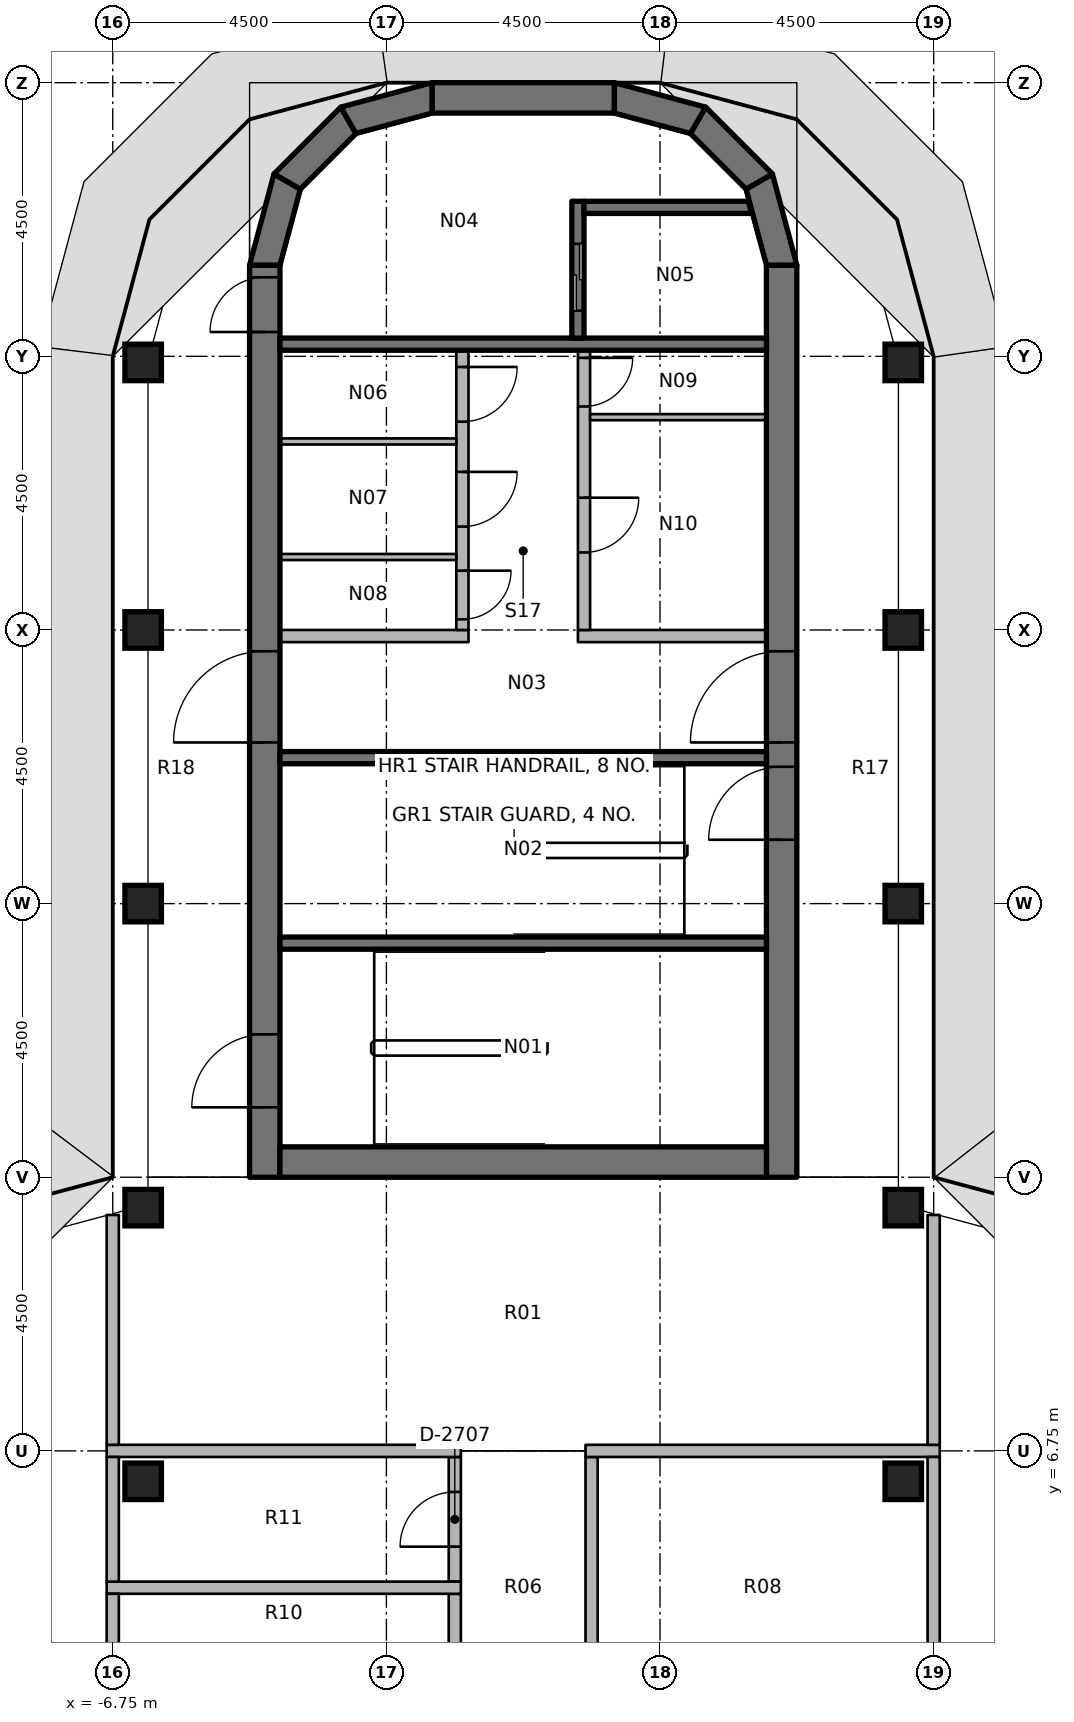
"""IFC4 building model, lengths in metres.
Left out: names, types, materials, properties, quantities, classifications, styles, units other than length and angle.
Written with IfcOpenShell. Run it as: python <this file> out.ifc"""

import sys

from ifc_helpers import new_model, si_unit, direction, frame, frame_2d, origin, origin_2d, place, context, subcontext, project, spatial, polyline, rectangle, outline, extrude, element, fill, save


model = new_model("IFC4")
c1 = context("Model", 3, precision=1e-05, world=origin(), true_north=direction((0.0, 1.0)))
c2 = subcontext(c1, "Body", "Model", "MODEL_VIEW")
j1 = project(units=[si_unit("LENGTHUNIT", "METRE"), si_unit("PLANEANGLEUNIT", "RADIAN")], contexts=[c1])
p1 = place(None, origin())
s1 = spatial("IfcSite", under=j1, at=p1, CompositionType="ELEMENT")
p2 = place(p1, origin())
s2 = spatial("IfcBuilding", under=s1, at=p2, CompositionType="ELEMENT")
p3 = place(p2, frame((0.0, 0.0, 253.6)))
s3 = spatial("IfcBuildingStorey", under=s2, at=p3, CompositionType="ELEMENT", Elevation=253.6)
for number, where, z_axis, x_axis in (
    (1, (-6.25, 6.25, 0.0), (0.0, 0.0, 1.0), (1.0, 0.0, 0.0)),
    (2, (-6.25, 10.75, 0.0), (0.0, 0.0, 1.0), (1.0, 0.0, 0.0)),
    (3, (-6.25, 15.75, 0.0), (0.0, 0.0, 1.0), (1.0, 0.0, 0.0)),
    (4, (-6.25, 20.25, 0.0), (0.0, 0.0, 1.0), (1.0, 0.0, 0.0)),
    (5, (-6.25, 24.65, 0.0), (0.0, 0.0, 1.0), (1.0, 0.0, 0.0)),
    (6, (6.25, 6.25, 0.0), (0.0, 0.0, 1.0), (1.0, 0.0, 0.0)),
    (7, (6.25, 10.75, 0.0), (0.0, 0.0, 1.0), (1.0, 0.0, 0.0)),
    (8, (6.25, 15.75, 0.0), (0.0, 0.0, 1.0), (1.0, 0.0, 0.0)),
    (9, (6.25, 20.25, 0.0), (0.0, 0.0, 1.0), (1.0, 0.0, 0.0)),
    (10, (6.25, 24.65, 0.0), (0.0, 0.0, 1.0), (1.0, 0.0, 0.0)),
):
    element("IfcColumn", number, at=place(p3, frame(where, z_axis=z_axis, x_axis=x_axis)), inside=s3, PredefinedType="COLUMN", context=c2, shape_type="SweptSolid", body=[
        extrude(rectangle(XDim=0.6, YDim=0.6, at=origin_2d()), origin(), (0.0, 0.0, 1.0), 3.65),
    ])
p4 = place(p3, frame((-4.25, 11.25, 0.0), z_axis=(0.0, 0.0, 1.0), x_axis=(0.0, 1.0, 0.0)))
e11 = element("IfcWall", 11, at=p4, inside=s3, PredefinedType="SHEAR", context=c2, shape_type="SweptSolid", body=[
    extrude(rectangle(XDim=15.0, YDim=0.5, at=frame_2d((7.5, 0.0))), origin(), (0.0, 0.0, 1.0), 3.8),
])
p5 = place(p4, frame((7.15, 0.0, 0.0)))
e12 = element("IfcOpeningElement", 12, at=p5, cuts=e11, PredefinedType="OPENING", context=c2, shape_type="SweptSolid", body=[
    extrude(rectangle(XDim=1.5, YDim=2.3, at=frame_2d((0.75, 1.15))), frame((0.0, 0.26, 0.0), z_axis=(0.0, -1.0, 0.0), x_axis=(1.0, 0.0, 0.0)), (0.0, 0.0, 1.0), 0.52),
])
p6 = place(p4, frame((13.9, 0.0, 0.0)))
e13 = element("IfcOpeningElement", 13, at=p6, cuts=e11, PredefinedType="OPENING", context=c2, shape_type="SweptSolid", body=[
    extrude(rectangle(XDim=0.9, YDim=2.1, at=frame_2d((0.45, 1.05))), frame((0.0, 0.26, 0.0), z_axis=(0.0, -1.0, 0.0), x_axis=(1.0, 0.0, 0.0)), (0.0, 0.0, 1.0), 0.52),
])
p7 = place(p4, frame((1.15, 0.0, 0.0)))
e14 = element("IfcOpeningElement", 14, at=p7, cuts=e11, PredefinedType="OPENING", context=c2, shape_type="SweptSolid", body=[
    extrude(rectangle(XDim=1.2, YDim=2.1, at=frame_2d((0.6, 1.05))), frame((0.0, 0.26, 0.0), z_axis=(0.0, -1.0, 0.0), x_axis=(1.0, 0.0, 0.0)), (0.0, 0.0, 1.0), 0.52),
])
p8 = place(p3, frame((4.25, 11.25, 0.0), z_axis=(0.0, 0.0, 1.0), x_axis=(0.0, 1.0, 0.0)))
e15 = element("IfcWall", 15, at=p8, inside=s3, PredefinedType="SHEAR", context=c2, shape_type="SweptSolid", body=[
    extrude(rectangle(XDim=15.0, YDim=0.5, at=frame_2d((7.5, 0.0))), origin(), (0.0, 0.0, 1.0), 3.8),
])
p9 = place(p8, frame((7.15, 0.0, 0.0)))
e16 = element("IfcOpeningElement", 16, at=p9, cuts=e15, PredefinedType="OPENING", context=c2, shape_type="SweptSolid", body=[
    extrude(rectangle(XDim=1.5, YDim=2.3, at=frame_2d((0.75, 1.15))), frame((0.0, 0.26, 0.0), z_axis=(0.0, -1.0, 0.0), x_axis=(1.0, 0.0, 0.0)), (0.0, 0.0, 1.0), 0.52),
])
p10 = place(p8, frame((5.55, 0.0, 0.0)))
e17 = element("IfcOpeningElement", 17, at=p10, cuts=e15, PredefinedType="OPENING", context=c2, shape_type="SweptSolid", body=[
    extrude(rectangle(XDim=1.2, YDim=2.1, at=frame_2d((0.6, 1.05))), frame((0.0, 0.26, 0.0), z_axis=(0.0, -1.0, 0.0), x_axis=(1.0, 0.0, 0.0)), (0.0, 0.0, 1.0), 0.52),
])
p11 = place(p3, frame((-4.0, 11.5, 0.0), z_axis=(0.0, 0.0, 1.0), x_axis=(1.0, 0.0, 0.0)))
e18 = element("IfcWall", 18, at=p11, inside=s3, PredefinedType="SHEAR", context=c2, shape_type="SweptSolid", body=[
    extrude(rectangle(XDim=8.0, YDim=0.5, at=frame_2d((4.0, 0.0))), origin(), (0.0, 0.0, 1.0), 3.8),
])
p12 = place(p3, frame((-1.5, 29.0, 0.0), z_axis=(0.0, 0.0, 1.0), x_axis=(1.0, 0.0, 0.0)))
e19 = element("IfcWall", 19, at=p12, inside=s3, PredefinedType="SHEAR", context=c2, shape_type="SweptSolid", body=[
    extrude(rectangle(XDim=3.0, YDim=0.5, at=frame_2d((1.5, 0.0))), origin(), (0.0, 0.0, 1.0), 3.8),
])
p13 = place(p3, origin())
e20 = element("IfcWall", 20, at=p13, inside=s3, PredefinedType="SHEAR", context=c2, shape_type="SweptSolid", body=[
    extrude(outline(polyline([(-4.5, 26.25), (-4.098, 27.75), (-3.665, 27.5), (-4.0, 26.25), (-4.5, 26.25)])), origin(), (0.0, 0.0, 1.0), 3.8),
])
p14 = place(p3, origin())
e21 = element("IfcWall", 21, at=p14, inside=s3, PredefinedType="SHEAR", context=c2, shape_type="SweptSolid", body=[
    extrude(outline(polyline([(-4.098, 27.75), (-3.0, 28.848), (-2.75, 28.415), (-3.665, 27.5), (-4.098, 27.75)])), origin(), (0.0, 0.0, 1.0), 3.8),
])
p15 = place(p3, origin())
e22 = element("IfcWall", 22, at=p15, inside=s3, PredefinedType="SHEAR", context=c2, shape_type="SweptSolid", body=[
    extrude(outline(polyline([(-3.0, 28.848), (-1.5, 29.25), (-1.5, 28.75), (-2.75, 28.415), (-3.0, 28.848)])), origin(), (0.0, 0.0, 1.0), 3.8),
])
p16 = place(p3, origin())
e23 = element("IfcWall", 23, at=p16, inside=s3, PredefinedType="SHEAR", context=c2, shape_type="SweptSolid", body=[
    extrude(outline(polyline([(4.5, 26.25), (4.098, 27.75), (3.665, 27.5), (4.0, 26.25), (4.5, 26.25)])), origin(), (0.0, 0.0, 1.0), 3.8),
])
p17 = place(p3, origin())
e24 = element("IfcWall", 24, at=p17, inside=s3, PredefinedType="SHEAR", context=c2, shape_type="SweptSolid", body=[
    extrude(outline(polyline([(4.098, 27.75), (3.0, 28.848), (2.75, 28.415), (3.665, 27.5), (4.098, 27.75)])), origin(), (0.0, 0.0, 1.0), 3.8),
])
p18 = place(p3, origin())
e25 = element("IfcWall", 25, at=p18, inside=s3, PredefinedType="SHEAR", context=c2, shape_type="SweptSolid", body=[
    extrude(outline(polyline([(3.0, 28.848), (1.5, 29.25), (1.5, 28.75), (2.75, 28.415), (3.0, 28.848)])), origin(), (0.0, 0.0, 1.0), 3.8),
])
p19 = place(p3, frame((-4.0, 24.95, 0.0), z_axis=(0.0, 0.0, 1.0), x_axis=(1.0, 0.0, 0.0)))
e26 = element("IfcWall", 26, at=p19, inside=s3, PredefinedType="SHEAR", context=c2, shape_type="SweptSolid", body=[
    extrude(rectangle(XDim=8.0, YDim=0.2, at=frame_2d((4.0, 0.0))), origin(), (0.0, 0.0, 1.0), 3.65),
])
p20 = place(p3, frame((0.9, 27.3, 0.0), z_axis=(0.0, 0.0, 1.0), x_axis=(0.0, -1.0, 0.0)))
e27 = element("IfcWall", 27, at=p20, inside=s3, PredefinedType="SHEAR", context=c2, shape_type="SweptSolid", body=[
    extrude(rectangle(XDim=2.25, YDim=0.2, at=frame_2d((1.125, 0.0))), origin(), (0.0, 0.0, 1.0), 3.65),
])
p21 = place(p20, frame((0.7, 0.0, 0.0)))
e28 = element("IfcOpeningElement", 28, at=p21, cuts=e27, PredefinedType="OPENING", context=c2, shape_type="SweptSolid", body=[
    extrude(rectangle(XDim=1.1, YDim=2.3, at=frame_2d((0.55, 1.15))), frame((0.0, 0.11, 0.0), z_axis=(0.0, -1.0, 0.0), x_axis=(1.0, 0.0, 0.0)), (0.0, 0.0, 1.0), 0.22),
])
p22 = place(p3, origin())
e29 = element("IfcWall", 29, at=p22, inside=s3, PredefinedType="SHEAR", context=c2, shape_type="SweptSolid", body=[
    extrude(outline(polyline([(1.0, 27.1), (3.755, 27.1), (3.701, 27.3), (1.0, 27.3), (1.0, 27.1)])), origin(), (0.0, 0.0, 1.0), 3.65),
])
for number, where, z_axis, x_axis in (
    (30, (-4.0, 18.15, 0.0), (0.0, 0.0, 1.0), (1.0, 0.0, 0.0)),
    (31, (-4.0, 15.1, 0.0), (0.0, 0.0, 1.0), (1.0, 0.0, 0.0)),
):
    element("IfcWall", number, at=place(p3, frame(where, z_axis=z_axis, x_axis=x_axis)), inside=s3, PredefinedType="SHEAR", context=c2, shape_type="SweptSolid", body=[
        extrude(rectangle(XDim=8.0, YDim=0.2, at=frame_2d((4.0, 0.0))), origin(), (0.0, 0.0, 1.0), 3.65),
    ])
p23 = place(p3, frame((-4.0, 20.15, 0.0), z_axis=(0.0, 0.0, 1.0), x_axis=(1.0, 0.0, 0.0)))
e32 = element("IfcWall", 32, at=p23, inside=s3, PredefinedType="PARTITIONING", context=c2, shape_type="SweptSolid", body=[
    extrude(rectangle(XDim=3.1, YDim=0.2, at=frame_2d((1.55, 0.0))), origin(), (0.0, 0.0, 1.0), 3.65),
])
p24 = place(p3, frame((-1.0, 24.85, 0.0), z_axis=(0.0, 0.0, 1.0), x_axis=(0.0, -1.0, 0.0)))
e33 = element("IfcWall", 33, at=p24, inside=s3, PredefinedType="PARTITIONING", context=c2, shape_type="SweptSolid", body=[
    extrude(rectangle(XDim=4.6, YDim=0.2, at=frame_2d((2.3, 0.0))), origin(), (0.0, 0.0, 1.0), 3.65),
])
p25 = place(p24, frame((0.275, 0.0, 0.0)))
e34 = element("IfcOpeningElement", 34, at=p25, cuts=e33, PredefinedType="OPENING", context=c2, shape_type="SweptSolid", body=[
    extrude(rectangle(XDim=0.9, YDim=2.1, at=frame_2d((0.45, 1.05))), frame((0.0, 0.11, 0.0), z_axis=(0.0, -1.0, 0.0), x_axis=(1.0, 0.0, 0.0)), (0.0, 0.0, 1.0), 0.22),
])
p26 = place(p24, frame((2.0, 0.0, 0.0)))
e35 = element("IfcOpeningElement", 35, at=p26, cuts=e33, PredefinedType="OPENING", context=c2, shape_type="SweptSolid", body=[
    extrude(rectangle(XDim=0.9, YDim=2.1, at=frame_2d((0.45, 1.05))), frame((0.0, 0.11, 0.0), z_axis=(0.0, -1.0, 0.0), x_axis=(1.0, 0.0, 0.0)), (0.0, 0.0, 1.0), 0.22),
])
p27 = place(p24, frame((3.625, 0.0, 0.0)))
e36 = element("IfcOpeningElement", 36, at=p27, cuts=e33, PredefinedType="OPENING", context=c2, shape_type="SweptSolid", body=[
    extrude(rectangle(XDim=0.8, YDim=2.1, at=frame_2d((0.4, 1.05))), frame((0.0, 0.11, 0.0), z_axis=(0.0, -1.0, 0.0), x_axis=(1.0, 0.0, 0.0)), (0.0, 0.0, 1.0), 0.22),
])
p28 = place(p3, frame((0.9, 20.15, 0.0), z_axis=(0.0, 0.0, 1.0), x_axis=(1.0, 0.0, 0.0)))
e37 = element("IfcWall", 37, at=p28, inside=s3, PredefinedType="PARTITIONING", context=c2, shape_type="SweptSolid", body=[
    extrude(rectangle(XDim=3.1, YDim=0.2, at=frame_2d((1.55, 0.0))), origin(), (0.0, 0.0, 1.0), 3.65),
])
p29 = place(p3, frame((1.0, 24.85, 0.0), z_axis=(0.0, 0.0, 1.0), x_axis=(0.0, -1.0, 0.0)))
e38 = element("IfcWall", 38, at=p29, inside=s3, PredefinedType="PARTITIONING", context=c2, shape_type="SweptSolid", body=[
    extrude(rectangle(XDim=4.6, YDim=0.2, at=frame_2d((2.3, 0.0))), origin(), (0.0, 0.0, 1.0), 3.65),
])
p30 = place(p29, frame((0.125, 0.0, 0.0)))
e39 = element("IfcOpeningElement", 39, at=p30, cuts=e38, PredefinedType="OPENING", context=c2, shape_type="SweptSolid", body=[
    extrude(rectangle(XDim=0.8, YDim=2.1, at=frame_2d((0.4, 1.05))), frame((0.0, 0.11, 0.0), z_axis=(0.0, -1.0, 0.0), x_axis=(1.0, 0.0, 0.0)), (0.0, 0.0, 1.0), 0.22),
])
p31 = place(p29, frame((2.425, 0.0, 0.0)))
e40 = element("IfcOpeningElement", 40, at=p31, cuts=e38, PredefinedType="OPENING", context=c2, shape_type="SweptSolid", body=[
    extrude(rectangle(XDim=0.9, YDim=2.1, at=frame_2d((0.45, 1.05))), frame((0.0, 0.11, 0.0), z_axis=(0.0, -1.0, 0.0), x_axis=(1.0, 0.0, 0.0)), (0.0, 0.0, 1.0), 0.22),
])
for number, where, z_axis, x_axis in (
    (41, (-4.0, 23.35, 0.0), (0.0, 0.0, 1.0), (1.0, 0.0, 0.0)),
    (42, (-4.0, 21.45, 0.0), (0.0, 0.0, 1.0), (1.0, 0.0, 0.0)),
    (43, (1.1, 23.75, 0.0), (0.0, 0.0, 1.0), (1.0, 0.0, 0.0)),
):
    element("IfcWall", number, at=place(p3, frame(where, z_axis=z_axis, x_axis=x_axis)), inside=s3, PredefinedType="PARTITIONING", context=c2, shape_type="SweptSolid", body=[
        extrude(rectangle(XDim=2.9, YDim=0.1, at=frame_2d((1.45, 0.0))), origin(), (0.0, 0.0, 1.0), 3.65),
    ])
p32 = place(p3, frame((1.125, 2.35, 0.0), z_axis=(0.0, 0.0, 1.0), x_axis=(0.0, 1.0, 0.0)))
e44 = element("IfcWall", 44, at=p32, inside=s3, PredefinedType="PARTITIONING", context=c2, shape_type="SweptSolid", body=[
    extrude(rectangle(XDim=4.3, YDim=0.2, at=frame_2d((2.15, 0.0))), origin(), (0.0, 0.0, 1.0), 2.75),
])
p33 = place(p3, frame((-1.125, 2.35, 0.0), z_axis=(0.0, 0.0, 1.0), x_axis=(0.0, 1.0, 0.0)))
e45 = element("IfcWall", 45, at=p33, inside=s3, PredefinedType="PARTITIONING", context=c2, shape_type="SweptSolid", body=[
    extrude(rectangle(XDim=2.05, YDim=0.2, at=frame_2d((1.025, 0.0))), origin(), (0.0, 0.0, 1.0), 2.75),
])
p34 = place(p3, frame((-1.125, 4.6, 0.0), z_axis=(0.0, 0.0, 1.0), x_axis=(0.0, 1.0, 0.0)))
e46 = element("IfcWall", 46, at=p34, inside=s3, PredefinedType="PARTITIONING", context=c2, shape_type="SweptSolid", body=[
    extrude(rectangle(XDim=2.05, YDim=0.2, at=frame_2d((1.025, 0.0))), origin(), (0.0, 0.0, 1.0), 2.75),
])
p35 = place(p34, frame((0.575, 0.0, 0.0)))
e47 = element("IfcOpeningElement", 47, at=p35, cuts=e46, PredefinedType="OPENING", context=c2, shape_type="SweptSolid", body=[
    extrude(rectangle(XDim=0.9, YDim=2.1, at=frame_2d((0.45, 1.05))), frame((0.0, 0.11, 0.0), z_axis=(0.0, -1.0, 0.0), x_axis=(1.0, 0.0, 0.0)), (0.0, 0.0, 1.0), 0.22),
])
p36 = place(p3, frame((1.025, 6.75, 0.0), z_axis=(0.0, 0.0, 1.0), x_axis=(1.0, 0.0, 0.0)))
e48 = element("IfcWall", 48, at=p36, inside=s3, PredefinedType="PARTITIONING", context=c2, shape_type="SweptSolid", body=[
    extrude(rectangle(XDim=5.825, YDim=0.2, at=frame_2d((2.913, 0.0))), origin(), (0.0, 0.0, 1.0), 2.75),
])
p37 = place(p3, frame((6.75, 6.85, 0.0), z_axis=(0.0, 0.0, 1.0), x_axis=(0.0, 1.0, 0.0)))
e49 = element("IfcWall", 49, at=p37, inside=s3, PredefinedType="PARTITIONING", context=c2, shape_type="SweptSolid", body=[
    extrude(rectangle(XDim=3.78, YDim=0.2, at=frame_2d((1.89, 0.0))), origin(), (0.0, 0.0, 1.0), 2.75),
])
p38 = place(p3, frame((-6.85, 6.75, 0.0), z_axis=(0.0, 0.0, 1.0), x_axis=(1.0, 0.0, 0.0)))
e50 = element("IfcWall", 50, at=p38, inside=s3, PredefinedType="PARTITIONING", context=c2, shape_type="SweptSolid", body=[
    extrude(rectangle(XDim=5.825, YDim=0.2, at=frame_2d((2.913, 0.0))), origin(), (0.0, 0.0, 1.0), 2.75),
])
p39 = place(p3, frame((-6.75, 6.85, 0.0), z_axis=(0.0, 0.0, 1.0), x_axis=(0.0, 1.0, 0.0)))
e51 = element("IfcWall", 51, at=p39, inside=s3, PredefinedType="PARTITIONING", context=c2, shape_type="SweptSolid", body=[
    extrude(rectangle(XDim=3.78, YDim=0.2, at=frame_2d((1.89, 0.0))), origin(), (0.0, 0.0, 1.0), 2.75),
])
p40 = place(p3, frame((6.75, 2.35, 0.0), z_axis=(0.0, 0.0, 1.0), x_axis=(0.0, 1.0, 0.0)))
e52 = element("IfcWall", 52, at=p40, inside=s3, PredefinedType="PARTITIONING", context=c2, shape_type="SweptSolid", body=[
    extrude(rectangle(XDim=4.3, YDim=0.2, at=frame_2d((2.15, 0.0))), origin(), (0.0, 0.0, 1.0), 2.75),
])
p41 = place(p3, frame((-6.85, 4.5, 0.0), z_axis=(0.0, 0.0, 1.0), x_axis=(1.0, 0.0, 0.0)))
e53 = element("IfcWall", 53, at=p41, inside=s3, PredefinedType="PARTITIONING", context=c2, shape_type="SweptSolid", body=[
    extrude(rectangle(XDim=5.825, YDim=0.2, at=frame_2d((2.913, 0.0))), origin(), (0.0, 0.0, 1.0), 2.75),
])
for number, where, z_axis, x_axis in (
    (54, (-6.75, 2.35, 0.0), (0.0, 0.0, 1.0), (0.0, 1.0, 0.0)),
    (55, (-6.75, 4.6, 0.0), (0.0, 0.0, 1.0), (0.0, 1.0, 0.0)),
):
    element("IfcWall", number, at=place(p3, frame(where, z_axis=z_axis, x_axis=x_axis)), inside=s3, PredefinedType="PARTITIONING", context=c2, shape_type="SweptSolid", body=[
        extrude(rectangle(XDim=2.05, YDim=0.2, at=frame_2d((1.025, 0.0))), origin(), (0.0, 0.0, 1.0), 2.75),
    ])
p42 = place(p5, origin())
e56 = element("IfcDoor", 56, at=p42, inside=s3, OperationType="DOUBLE_DOOR_SINGLE_SWING", PredefinedType="DOOR", context=c2, shape_type="SweptSolid", body=[
    extrude(rectangle(XDim=1.5, YDim=2.3, at=frame_2d((0.75, 1.15))), frame((0.0, 0.025, 0.0), z_axis=(0.0, -1.0, 0.0), x_axis=(1.0, 0.0, 0.0)), (0.0, 0.0, 1.0), 0.05),
])
fill(e12, e56)
p43 = place(p9, origin())
e57 = element("IfcDoor", 57, at=p43, inside=s3, OperationType="DOUBLE_DOOR_SINGLE_SWING", PredefinedType="DOOR", context=c2, shape_type="SweptSolid", body=[
    extrude(rectangle(XDim=1.5, YDim=2.3, at=frame_2d((0.75, 1.15))), frame((0.0, 0.025, 0.0), z_axis=(0.0, -1.0, 0.0), x_axis=(1.0, 0.0, 0.0)), (0.0, 0.0, 1.0), 0.05),
])
fill(e16, e57)
p44 = place(p6, origin())
e58 = element("IfcDoor", 58, at=p44, inside=s3, OperationType="SINGLE_SWING_LEFT", PredefinedType="DOOR", context=c2, shape_type="SweptSolid", body=[
    extrude(rectangle(XDim=0.9, YDim=2.1, at=frame_2d((0.45, 1.05))), frame((0.0, 0.025, 0.0), z_axis=(0.0, -1.0, 0.0), x_axis=(1.0, 0.0, 0.0)), (0.0, 0.0, 1.0), 0.05),
])
fill(e13, e58)
p45 = place(p10, origin())
e59 = element("IfcDoor", 59, at=p45, inside=s3, OperationType="SINGLE_SWING_LEFT", PredefinedType="DOOR", context=c2, shape_type="SweptSolid", body=[
    extrude(rectangle(XDim=1.2, YDim=2.1, at=frame_2d((0.6, 1.05))), frame((0.0, 0.025, 0.0), z_axis=(0.0, -1.0, 0.0), x_axis=(1.0, 0.0, 0.0)), (0.0, 0.0, 1.0), 0.05),
])
fill(e17, e59)
p46 = place(p7, origin())
e60 = element("IfcDoor", 60, at=p46, inside=s3, OperationType="SINGLE_SWING_RIGHT", PredefinedType="DOOR", context=c2, shape_type="SweptSolid", body=[
    extrude(rectangle(XDim=1.2, YDim=2.1, at=frame_2d((0.6, 1.05))), frame((0.0, 0.025, 0.0), z_axis=(0.0, -1.0, 0.0), x_axis=(1.0, 0.0, 0.0)), (0.0, 0.0, 1.0), 0.05),
])
fill(e14, e60)
p47 = place(p21, origin())
e61 = element("IfcDoor", 61, at=p47, inside=s3, OperationType="DOUBLE_DOOR_SLIDING", PredefinedType="DOOR", context=c2, shape_type="SweptSolid", body=[
    extrude(rectangle(XDim=1.1, YDim=2.3, at=frame_2d((0.55, 1.15))), frame((0.0, 0.025, 0.0), z_axis=(0.0, -1.0, 0.0), x_axis=(1.0, 0.0, 0.0)), (0.0, 0.0, 1.0), 0.05),
])
fill(e28, e61)
p48 = place(p25, origin())
e62 = element("IfcDoor", 62, at=p48, inside=s3, OperationType="SINGLE_SWING_LEFT", PredefinedType="DOOR", context=c2, shape_type="SweptSolid", body=[
    extrude(rectangle(XDim=0.9, YDim=2.1, at=frame_2d((0.45, 1.05))), frame((0.0, 0.025, 0.0), z_axis=(0.0, -1.0, 0.0), x_axis=(1.0, 0.0, 0.0)), (0.0, 0.0, 1.0), 0.05),
])
fill(e34, e62)
p49 = place(p26, origin())
e63 = element("IfcDoor", 63, at=p49, inside=s3, OperationType="SINGLE_SWING_LEFT", PredefinedType="DOOR", context=c2, shape_type="SweptSolid", body=[
    extrude(rectangle(XDim=0.9, YDim=2.1, at=frame_2d((0.45, 1.05))), frame((0.0, 0.025, 0.0), z_axis=(0.0, -1.0, 0.0), x_axis=(1.0, 0.0, 0.0)), (0.0, 0.0, 1.0), 0.05),
])
fill(e35, e63)
p50 = place(p27, origin())
e64 = element("IfcDoor", 64, at=p50, inside=s3, OperationType="SINGLE_SWING_RIGHT", PredefinedType="DOOR", context=c2, shape_type="SweptSolid", body=[
    extrude(rectangle(XDim=0.8, YDim=2.1, at=frame_2d((0.4, 1.05))), frame((0.0, 0.025, 0.0), z_axis=(0.0, -1.0, 0.0), x_axis=(1.0, 0.0, 0.0)), (0.0, 0.0, 1.0), 0.05),
])
fill(e36, e64)
p51 = place(p30, origin())
e65 = element("IfcDoor", 65, at=p51, inside=s3, OperationType="SINGLE_SWING_LEFT", PredefinedType="DOOR", context=c2, shape_type="SweptSolid", body=[
    extrude(rectangle(XDim=0.8, YDim=2.1, at=frame_2d((0.4, 1.05))), frame((0.0, 0.025, 0.0), z_axis=(0.0, -1.0, 0.0), x_axis=(1.0, 0.0, 0.0)), (0.0, 0.0, 1.0), 0.05),
])
fill(e39, e65)
p52 = place(p31, origin())
e66 = element("IfcDoor", 66, at=p52, inside=s3, OperationType="SINGLE_SWING_RIGHT", PredefinedType="DOOR", context=c2, shape_type="SweptSolid", body=[
    extrude(rectangle(XDim=0.9, YDim=2.1, at=frame_2d((0.45, 1.05))), frame((0.0, 0.025, 0.0), z_axis=(0.0, -1.0, 0.0), x_axis=(1.0, 0.0, 0.0)), (0.0, 0.0, 1.0), 0.05),
])
fill(e40, e66)
p53 = place(p35, origin())
e67 = element("IfcDoor", 67, at=p53, inside=s3, OperationType="SINGLE_SWING_RIGHT", PredefinedType="DOOR", context=c2, shape_type="SweptSolid", body=[
    extrude(rectangle(XDim=0.9, YDim=2.1, at=frame_2d((0.45, 1.05))), frame((0.0, 0.025, 0.0), z_axis=(0.0, -1.0, 0.0), x_axis=(1.0, 0.0, 0.0)), (0.0, 0.0, 1.0), 0.05),
])
fill(e47, e67)
save(model, sys.argv[1])
